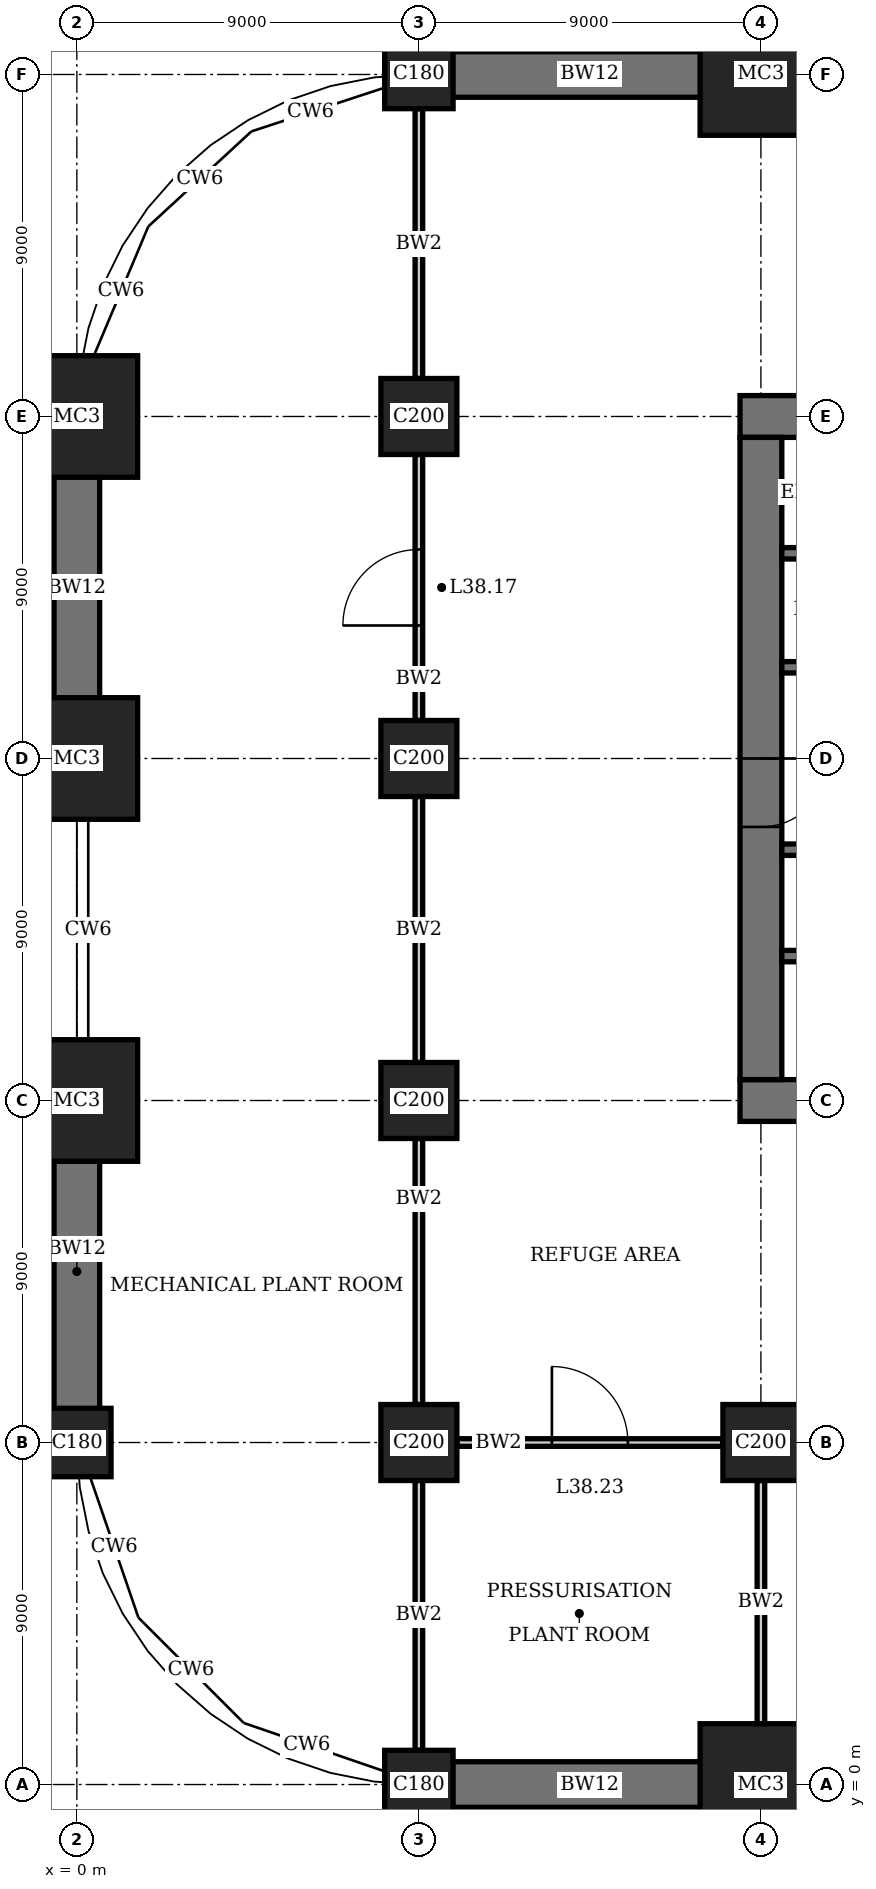
"""IFC4 building model, lengths in metres.
Left out: names, types, materials, properties, quantities, classifications, styles, units other than length and angle.
Written with IfcOpenShell. Run it as: python <this file> out.ifc"""

import sys

from ifc_helpers import new_model, si_unit, direction, frame, frame_2d, origin, origin_2d, place, context, subcontext, project, spatial, rectangle, extrude, element, fill, save


model = new_model("IFC4")
c1 = context("Model", 3, precision=1e-05, world=origin(), true_north=direction((0.0, 1.0)))
c2 = subcontext(c1, "Body", "Model", "MODEL_VIEW")
j1 = project(units=[si_unit("LENGTHUNIT", "METRE"), si_unit("PLANEANGLEUNIT", "RADIAN")], contexts=[c1])
p1 = place(None, origin())
s1 = spatial("IfcSite", under=j1, at=p1, CompositionType="ELEMENT")
p2 = place(p1, origin())
s2 = spatial("IfcBuilding", under=s1, at=p2, CompositionType="ELEMENT")
p3 = place(p2, frame((0.0, 0.0, 157.2)))
s3 = spatial("IfcBuildingStorey", under=s2, at=p3, CompositionType="ELEMENT", Elevation=157.2)
p4 = place(p3, frame((0.0, 9.0, 0.0), z_axis=(0.0, 0.0, 1.0), x_axis=(1.0, 0.0, 0.0)))
e1 = element("IfcColumn", 1, at=p4, inside=s3, PredefinedType="COLUMN", context=c2, shape_type="SweptSolid", body=[
    extrude(rectangle(XDim=1.8, YDim=1.8, at=origin_2d()), origin(), (0.0, 0.0, 1.0), 5.0),
])
for number, where, z_axis, x_axis in (
    (2, (0.0, 18.0, 0.0), (0.0, 0.0, 1.0), (1.0, 0.0, 0.0)),
    (3, (0.0, 27.0, 0.0), (0.0, 0.0, 1.0), (1.0, 0.0, 0.0)),
    (4, (0.0, 36.0, 0.0), (0.0, 0.0, 1.0), (1.0, 0.0, 0.0)),
):
    element("IfcColumn", number, at=place(p3, frame(where, z_axis=z_axis, x_axis=x_axis)), inside=s3, PredefinedType="COLUMN", context=c2, shape_type="SweptSolid", body=[
        extrude(rectangle(XDim=3.2, YDim=3.2, at=origin_2d()), origin(), (0.0, 0.0, 1.0), 5.0),
    ])
p5 = place(p3, frame((9.0, 0.0, 0.0), z_axis=(0.0, 0.0, 1.0), x_axis=(1.0, 0.0, 0.0)))
e5 = element("IfcColumn", 5, at=p5, inside=s3, PredefinedType="COLUMN", context=c2, shape_type="SweptSolid", body=[
    extrude(rectangle(XDim=1.8, YDim=1.8, at=origin_2d()), origin(), (0.0, 0.0, 1.0), 5.0),
])
for number, where, z_axis, x_axis in (
    (6, (9.0, 9.0, 0.0), (0.0, 0.0, 1.0), (1.0, 0.0, 0.0)),
    (7, (9.0, 18.0, 0.0), (0.0, 0.0, 1.0), (1.0, 0.0, 0.0)),
    (8, (9.0, 27.0, 0.0), (0.0, 0.0, 1.0), (1.0, 0.0, 0.0)),
    (9, (9.0, 36.0, 0.0), (0.0, 0.0, 1.0), (1.0, 0.0, 0.0)),
):
    element("IfcColumn", number, at=place(p3, frame(where, z_axis=z_axis, x_axis=x_axis)), inside=s3, PredefinedType="COLUMN", context=c2, shape_type="SweptSolid", body=[
        extrude(rectangle(XDim=2.0, YDim=2.0, at=origin_2d()), origin(), (0.0, 0.0, 1.0), 5.0),
    ])
p6 = place(p3, frame((9.0, 45.0, 0.0), z_axis=(0.0, 0.0, 1.0), x_axis=(1.0, 0.0, 0.0)))
e10 = element("IfcColumn", 10, at=p6, inside=s3, PredefinedType="COLUMN", context=c2, shape_type="SweptSolid", body=[
    extrude(rectangle(XDim=1.8, YDim=1.8, at=origin_2d()), origin(), (0.0, 0.0, 1.0), 5.0),
])
p7 = place(p3, frame((18.0, 0.0, 0.0), z_axis=(0.0, 0.0, 1.0), x_axis=(1.0, 0.0, 0.0)))
e11 = element("IfcColumn", 11, at=p7, inside=s3, PredefinedType="COLUMN", context=c2, shape_type="SweptSolid", body=[
    extrude(rectangle(XDim=3.2, YDim=3.2, at=origin_2d()), origin(), (0.0, 0.0, 1.0), 5.0),
])
p8 = place(p3, frame((18.0, 9.0, 0.0), z_axis=(0.0, 0.0, 1.0), x_axis=(1.0, 0.0, 0.0)))
e12 = element("IfcColumn", 12, at=p8, inside=s3, PredefinedType="COLUMN", context=c2, shape_type="SweptSolid", body=[
    extrude(rectangle(XDim=2.0, YDim=2.0, at=origin_2d()), origin(), (0.0, 0.0, 1.0), 5.0),
])
p9 = place(p3, frame((18.0, 45.0, 0.0), z_axis=(0.0, 0.0, 1.0), x_axis=(1.0, 0.0, 0.0)))
e13 = element("IfcColumn", 13, at=p9, inside=s3, PredefinedType="COLUMN", context=c2, shape_type="SweptSolid", body=[
    extrude(rectangle(XDim=3.2, YDim=3.2, at=origin_2d()), origin(), (0.0, 0.0, 1.0), 5.0),
])
p10 = place(p3, frame((17.45, 18.0, 0.0), z_axis=(0.0, 0.0, 1.0), x_axis=(1.0, 0.0, 0.0)))
e14 = element("IfcWall", 14, at=p10, inside=s3, PredefinedType="SHEAR", context=c2, shape_type="SweptSolid", body=[
    extrude(rectangle(XDim=28.1, YDim=1.1, at=frame_2d((14.05, 0.0))), origin(), (0.0, 0.0, 1.0), 5.0),
])
p11 = place(p10, frame((11.55, 0.0, 0.0)))
e15 = element("IfcOpeningElement", 15, at=p11, cuts=e14, PredefinedType="OPENING", context=c2, shape_type="SweptSolid", body=[
    extrude(rectangle(XDim=1.0, YDim=2.4, at=frame_2d((0.5, 1.2))), frame((0.0, 0.56, 0.0), z_axis=(0.0, -1.0, 0.0), x_axis=(1.0, 0.0, 0.0)), (0.0, 0.0, 1.0), 1.12),
])
p12 = place(p10, frame((16.55, 0.0, 0.0)))
e16 = element("IfcOpeningElement", 16, at=p12, cuts=e14, PredefinedType="OPENING", context=c2, shape_type="SweptSolid", body=[
    extrude(rectangle(XDim=1.0, YDim=2.4, at=frame_2d((0.5, 1.2))), frame((0.0, 0.56, 0.0), z_axis=(0.0, -1.0, 0.0), x_axis=(1.0, 0.0, 0.0)), (0.0, 0.0, 1.0), 1.12),
])
p13 = place(p10, frame((20.0, 0.0, 0.0)))
e17 = element("IfcOpeningElement", 17, at=p13, cuts=e14, PredefinedType="OPENING", context=c2, shape_type="SweptSolid", body=[
    extrude(rectangle(XDim=1.1, YDim=2.4, at=frame_2d((0.55, 1.2))), frame((0.0, 0.56, 0.0), z_axis=(0.0, -1.0, 0.0), x_axis=(1.0, 0.0, 0.0)), (0.0, 0.0, 1.0), 1.12),
])
p14 = place(p10, frame((24.05, 0.0, 0.0)))
e18 = element("IfcOpeningElement", 18, at=p14, cuts=e14, PredefinedType="OPENING", context=c2, shape_type="SweptSolid", body=[
    extrude(rectangle(XDim=1.0, YDim=2.4, at=frame_2d((0.5, 1.2))), frame((0.0, 0.56, 0.0), z_axis=(0.0, -1.0, 0.0), x_axis=(1.0, 0.0, 0.0)), (0.0, 0.0, 1.0), 1.12),
])
p15 = place(p3, frame((45.55, 36.0, 0.0), z_axis=(0.0, 0.0, 1.0), x_axis=(-1.0, 0.0, 0.0)))
e19 = element("IfcWall", 19, at=p15, inside=s3, PredefinedType="SHEAR", context=c2, shape_type="SweptSolid", body=[
    extrude(rectangle(XDim=28.1, YDim=1.1, at=frame_2d((14.05, 0.0))), origin(), (0.0, 0.0, 1.0), 5.0),
])
p16 = place(p15, frame((11.55, 0.0, 0.0)))
e20 = element("IfcOpeningElement", 20, at=p16, cuts=e19, PredefinedType="OPENING", context=c2, shape_type="SweptSolid", body=[
    extrude(rectangle(XDim=1.0, YDim=2.4, at=frame_2d((0.5, 1.2))), frame((0.0, 0.56, 0.0), z_axis=(0.0, -1.0, 0.0), x_axis=(1.0, 0.0, 0.0)), (0.0, 0.0, 1.0), 1.12),
])
p17 = place(p15, frame((16.55, 0.0, 0.0)))
e21 = element("IfcOpeningElement", 21, at=p17, cuts=e19, PredefinedType="OPENING", context=c2, shape_type="SweptSolid", body=[
    extrude(rectangle(XDim=1.0, YDim=2.4, at=frame_2d((0.5, 1.2))), frame((0.0, 0.56, 0.0), z_axis=(0.0, -1.0, 0.0), x_axis=(1.0, 0.0, 0.0)), (0.0, 0.0, 1.0), 1.12),
])
p18 = place(p15, frame((20.0, 0.0, 0.0)))
e22 = element("IfcOpeningElement", 22, at=p18, cuts=e19, PredefinedType="OPENING", context=c2, shape_type="SweptSolid", body=[
    extrude(rectangle(XDim=1.1, YDim=2.4, at=frame_2d((0.55, 1.2))), frame((0.0, 0.56, 0.0), z_axis=(0.0, -1.0, 0.0), x_axis=(1.0, 0.0, 0.0)), (0.0, 0.0, 1.0), 1.12),
])
p19 = place(p15, frame((24.05, 0.0, 0.0)))
e23 = element("IfcOpeningElement", 23, at=p19, cuts=e19, PredefinedType="OPENING", context=c2, shape_type="SweptSolid", body=[
    extrude(rectangle(XDim=1.0, YDim=2.4, at=frame_2d((0.5, 1.2))), frame((0.0, 0.56, 0.0), z_axis=(0.0, -1.0, 0.0), x_axis=(1.0, 0.0, 0.0)), (0.0, 0.0, 1.0), 1.12),
])
p20 = place(p3, frame((18.0, 35.45, 0.0), z_axis=(0.0, 0.0, 1.0), x_axis=(0.0, -1.0, 0.0)))
e24 = element("IfcWall", 24, at=p20, inside=s3, PredefinedType="SHEAR", context=c2, shape_type="SweptSolid", body=[
    extrude(rectangle(XDim=16.9, YDim=1.1, at=frame_2d((8.45, 0.0))), origin(), (0.0, 0.0, 1.0), 5.0),
])
p21 = place(p20, frame((8.45, 0.0, 0.0)))
e25 = element("IfcOpeningElement", 25, at=p21, cuts=e24, PredefinedType="OPENING", context=c2, shape_type="SweptSolid", body=[
    extrude(rectangle(XDim=1.8, YDim=2.4, at=frame_2d((0.9, 1.2))), frame((0.0, 0.56, 0.0), z_axis=(0.0, -1.0, 0.0), x_axis=(1.0, 0.0, 0.0)), (0.0, 0.0, 1.0), 1.12),
])
p22 = place(p3, frame((18.55, 21.8, 0.0), z_axis=(0.0, 0.0, 1.0), x_axis=(1.0, 0.0, 0.0)))
e26 = element("IfcWall", 26, at=p22, inside=s3, PredefinedType="SHEAR", context=c2, shape_type="SweptSolid", body=[
    extrude(rectangle(XDim=8.3, YDim=0.3, at=frame_2d((4.15, 0.0))), origin(), (0.0, 0.0, 1.0), 5.0),
])
p23 = place(p22, frame((6.85, 0.0, 0.0)))
e27 = element("IfcOpeningElement", 27, at=p23, cuts=e26, PredefinedType="OPENING", context=c2, shape_type="SweptSolid", body=[
    extrude(rectangle(XDim=1.0, YDim=2.4, at=frame_2d((0.5, 1.2))), frame((0.0, 0.16, 0.0), z_axis=(0.0, -1.0, 0.0), x_axis=(1.0, 0.0, 0.0)), (0.0, 0.0, 1.0), 0.32),
])
p24 = place(p3, frame((18.55, 24.6, 0.0), z_axis=(0.0, 0.0, 1.0), x_axis=(1.0, 0.0, 0.0)))
e28 = element("IfcWall", 28, at=p24, inside=s3, PredefinedType="SHEAR", context=c2, shape_type="SweptSolid", body=[
    extrude(rectangle(XDim=25.9, YDim=0.3, at=frame_2d((12.95, 0.0))), origin(), (0.0, 0.0, 1.0), 5.0),
])
p25 = place(p24, frame((4.95, 0.0, 0.0)))
e29 = element("IfcOpeningElement", 29, at=p25, cuts=e28, PredefinedType="OPENING", context=c2, shape_type="SweptSolid", body=[
    extrude(rectangle(XDim=1.0, YDim=2.4, at=frame_2d((0.5, 1.2))), frame((0.0, 0.16, 0.0), z_axis=(0.0, -1.0, 0.0), x_axis=(1.0, 0.0, 0.0)), (0.0, 0.0, 1.0), 0.32),
])
p26 = place(p24, frame((24.5, 0.0, 0.0)))
e30 = element("IfcOpeningElement", 30, at=p26, cuts=e28, PredefinedType="OPENING", context=c2, shape_type="SweptSolid", body=[
    extrude(rectangle(XDim=0.9, YDim=2.1, at=frame_2d((0.45, 1.05))), frame((0.0, 0.16, 0.0), z_axis=(0.0, -1.0, 0.0), x_axis=(1.0, 0.0, 0.0)), (0.0, 0.0, 1.0), 0.32),
])
p27 = place(p24, frame((9.4, 0.0, 0.0)))
e31 = element("IfcOpeningElement", 31, at=p27, cuts=e28, PredefinedType="OPENING", context=c2, shape_type="SweptSolid", body=[
    extrude(rectangle(XDim=1.1, YDim=2.4, at=frame_2d((0.55, 1.2))), frame((0.0, 0.16, 0.0), z_axis=(0.0, -1.0, 0.0), x_axis=(1.0, 0.0, 0.0)), (0.0, 0.0, 1.0), 0.32),
])
p28 = place(p24, frame((12.4, 0.0, 0.0)))
e32 = element("IfcOpeningElement", 32, at=p28, cuts=e28, PredefinedType="OPENING", context=c2, shape_type="SweptSolid", body=[
    extrude(rectangle(XDim=1.1, YDim=2.4, at=frame_2d((0.55, 1.2))), frame((0.0, 0.16, 0.0), z_axis=(0.0, -1.0, 0.0), x_axis=(1.0, 0.0, 0.0)), (0.0, 0.0, 1.0), 0.32),
])
p29 = place(p24, frame((15.4, 0.0, 0.0)))
e33 = element("IfcOpeningElement", 33, at=p29, cuts=e28, PredefinedType="OPENING", context=c2, shape_type="SweptSolid", body=[
    extrude(rectangle(XDim=1.1, YDim=2.4, at=frame_2d((0.55, 1.2))), frame((0.0, 0.16, 0.0), z_axis=(0.0, -1.0, 0.0), x_axis=(1.0, 0.0, 0.0)), (0.0, 0.0, 1.0), 0.32),
])
p30 = place(p24, frame((18.4, 0.0, 0.0)))
e34 = element("IfcOpeningElement", 34, at=p30, cuts=e28, PredefinedType="OPENING", context=c2, shape_type="SweptSolid", body=[
    extrude(rectangle(XDim=1.1, YDim=2.4, at=frame_2d((0.55, 1.2))), frame((0.0, 0.16, 0.0), z_axis=(0.0, -1.0, 0.0), x_axis=(1.0, 0.0, 0.0)), (0.0, 0.0, 1.0), 0.32),
])
p31 = place(p24, frame((21.3, 0.0, 0.0)))
e35 = element("IfcOpeningElement", 35, at=p31, cuts=e28, PredefinedType="OPENING", context=c2, shape_type="SweptSolid", body=[
    extrude(rectangle(XDim=1.3, YDim=2.4, at=frame_2d((0.65, 1.2))), frame((0.0, 0.16, 0.0), z_axis=(0.0, -1.0, 0.0), x_axis=(1.0, 0.0, 0.0)), (0.0, 0.0, 1.0), 0.32),
])
p32 = place(p3, frame((18.55, 29.4, 0.0), z_axis=(0.0, 0.0, 1.0), x_axis=(1.0, 0.0, 0.0)))
e36 = element("IfcWall", 36, at=p32, inside=s3, PredefinedType="SHEAR", context=c2, shape_type="SweptSolid", body=[
    extrude(rectangle(XDim=25.9, YDim=0.3, at=frame_2d((12.95, 0.0))), origin(), (0.0, 0.0, 1.0), 5.0),
])
p33 = place(p32, frame((19.95, 0.0, 0.0)))
e37 = element("IfcOpeningElement", 37, at=p33, cuts=e36, PredefinedType="OPENING", context=c2, shape_type="SweptSolid", body=[
    extrude(rectangle(XDim=1.0, YDim=2.4, at=frame_2d((0.5, 1.2))), frame((0.0, 0.16, 0.0), z_axis=(0.0, -1.0, 0.0), x_axis=(1.0, 0.0, 0.0)), (0.0, 0.0, 1.0), 0.32),
])
p34 = place(p32, frame((0.5, 0.0, 0.0)))
e38 = element("IfcOpeningElement", 38, at=p34, cuts=e36, PredefinedType="OPENING", context=c2, shape_type="SweptSolid", body=[
    extrude(rectangle(XDim=0.9, YDim=2.1, at=frame_2d((0.45, 1.05))), frame((0.0, 0.16, 0.0), z_axis=(0.0, -1.0, 0.0), x_axis=(1.0, 0.0, 0.0)), (0.0, 0.0, 1.0), 0.32),
])
p35 = place(p32, frame((9.4, 0.0, 0.0)))
e39 = element("IfcOpeningElement", 39, at=p35, cuts=e36, PredefinedType="OPENING", context=c2, shape_type="SweptSolid", body=[
    extrude(rectangle(XDim=1.1, YDim=2.4, at=frame_2d((0.55, 1.2))), frame((0.0, 0.16, 0.0), z_axis=(0.0, -1.0, 0.0), x_axis=(1.0, 0.0, 0.0)), (0.0, 0.0, 1.0), 0.32),
])
p36 = place(p32, frame((6.4, 0.0, 0.0)))
e40 = element("IfcOpeningElement", 40, at=p36, cuts=e36, PredefinedType="OPENING", context=c2, shape_type="SweptSolid", body=[
    extrude(rectangle(XDim=1.1, YDim=2.4, at=frame_2d((0.55, 1.2))), frame((0.0, 0.16, 0.0), z_axis=(0.0, -1.0, 0.0), x_axis=(1.0, 0.0, 0.0)), (0.0, 0.0, 1.0), 0.32),
])
p37 = place(p32, frame((3.3, 0.0, 0.0)))
e41 = element("IfcOpeningElement", 41, at=p37, cuts=e36, PredefinedType="OPENING", context=c2, shape_type="SweptSolid", body=[
    extrude(rectangle(XDim=1.3, YDim=2.4, at=frame_2d((0.65, 1.2))), frame((0.0, 0.16, 0.0), z_axis=(0.0, -1.0, 0.0), x_axis=(1.0, 0.0, 0.0)), (0.0, 0.0, 1.0), 0.32),
])
p38 = place(p3, frame((18.55, 32.4, 0.0), z_axis=(0.0, 0.0, 1.0), x_axis=(1.0, 0.0, 0.0)))
e42 = element("IfcWall", 42, at=p38, inside=s3, PredefinedType="SHEAR", context=c2, shape_type="SweptSolid", body=[
    extrude(rectangle(XDim=17.3, YDim=0.3, at=frame_2d((8.65, 0.0))), origin(), (0.0, 0.0, 1.0), 5.0),
])
for number, where, z_axis, x_axis in (
    (43, (9.0, 0.0, 0.0), (0.0, 0.0, 1.0), (1.0, 0.0, 0.0)),
    (44, (9.0, 45.0, 0.0), (0.0, 0.0, 1.0), (1.0, 0.0, 0.0)),
    (45, (0.0, 9.0, 0.0), (0.0, 0.0, 1.0), (0.0, 1.0, 0.0)),
    (46, (0.0, 27.0, 0.0), (0.0, 0.0, 1.0), (0.0, 1.0, 0.0)),
):
    element("IfcWall", number, at=place(p3, frame(where, z_axis=z_axis, x_axis=x_axis)), inside=s3, PredefinedType="SHEAR", context=c2, shape_type="SweptSolid", body=[
        extrude(rectangle(XDim=9.0, YDim=1.2, at=frame_2d((4.5, 0.0))), origin(), (0.0, 0.0, 1.0), 5.0),
    ])
p39 = place(p3, frame((9.0, 0.9, 0.0), z_axis=(0.0, 0.0, 1.0), x_axis=(0.0, 1.0, 0.0)))
e47 = element("IfcWall", 47, at=p39, inside=s3, PredefinedType="SOLIDWALL", context=c2, shape_type="SweptSolid", body=[
    extrude(rectangle(XDim=7.1, YDim=0.2, at=frame_2d((3.55, 0.0))), origin(), (0.0, 0.0, 1.0), 3.8),
])
for number, where, z_axis, x_axis in (
    (48, (9.0, 10.0, 0.0), (0.0, 0.0, 1.0), (0.0, 1.0, 0.0)),
    (49, (9.0, 19.0, 0.0), (0.0, 0.0, 1.0), (0.0, 1.0, 0.0)),
):
    element("IfcWall", number, at=place(p3, frame(where, z_axis=z_axis, x_axis=x_axis)), inside=s3, PredefinedType="SOLIDWALL", context=c2, shape_type="SweptSolid", body=[
        extrude(rectangle(XDim=7.0, YDim=0.2, at=frame_2d((3.5, 0.0))), origin(), (0.0, 0.0, 1.0), 3.8),
    ])
p40 = place(p3, frame((9.0, 28.0, 0.0), z_axis=(0.0, 0.0, 1.0), x_axis=(0.0, 1.0, 0.0)))
e50 = element("IfcWall", 50, at=p40, inside=s3, PredefinedType="SOLIDWALL", context=c2, shape_type="SweptSolid", body=[
    extrude(rectangle(XDim=7.0, YDim=0.2, at=frame_2d((3.5, 0.0))), origin(), (0.0, 0.0, 1.0), 3.8),
])
p41 = place(p40, frame((2.5, 0.0, 0.0)))
e51 = element("IfcOpeningElement", 51, at=p41, cuts=e50, PredefinedType="OPENING", context=c2, shape_type="SweptSolid", body=[
    extrude(rectangle(XDim=2.0, YDim=2.7, at=frame_2d((1.0, 1.35))), frame((0.0, 0.11, 0.0), z_axis=(0.0, -1.0, 0.0), x_axis=(1.0, 0.0, 0.0)), (0.0, 0.0, 1.0), 0.22),
])
p42 = place(p3, frame((9.0, 37.0, 0.0), z_axis=(0.0, 0.0, 1.0), x_axis=(0.0, 1.0, 0.0)))
e52 = element("IfcWall", 52, at=p42, inside=s3, PredefinedType="SOLIDWALL", context=c2, shape_type="SweptSolid", body=[
    extrude(rectangle(XDim=7.1, YDim=0.2, at=frame_2d((3.55, 0.0))), origin(), (0.0, 0.0, 1.0), 3.8),
])
p43 = place(p3, frame((18.0, 1.6, 0.0), z_axis=(0.0, 0.0, 1.0), x_axis=(0.0, 1.0, 0.0)))
e53 = element("IfcWall", 53, at=p43, inside=s3, PredefinedType="SOLIDWALL", context=c2, shape_type="SweptSolid", body=[
    extrude(rectangle(XDim=6.4, YDim=0.2, at=frame_2d((3.2, 0.0))), origin(), (0.0, 0.0, 1.0), 4.0),
])
p44 = place(p3, frame((10.0, 9.0, 0.0), z_axis=(0.0, 0.0, 1.0), x_axis=(1.0, 0.0, 0.0)))
e54 = element("IfcWall", 54, at=p44, inside=s3, PredefinedType="SOLIDWALL", context=c2, shape_type="SweptSolid", body=[
    extrude(rectangle(XDim=7.0, YDim=0.2, at=frame_2d((3.5, 0.0))), origin(), (0.0, 0.0, 1.0), 3.8),
])
p45 = place(p44, frame((2.5, 0.0, 0.0)))
e55 = element("IfcOpeningElement", 55, at=p45, cuts=e54, PredefinedType="OPENING", context=c2, shape_type="SweptSolid", body=[
    extrude(rectangle(XDim=2.0, YDim=2.7, at=frame_2d((1.0, 1.35))), frame((0.0, 0.11, 0.0), z_axis=(0.0, -1.0, 0.0), x_axis=(1.0, 0.0, 0.0)), (0.0, 0.0, 1.0), 0.22),
])
p46 = place(p21, origin())
e56 = element("IfcDoor", 56, at=p46, inside=s3, OperationType="DOUBLE_DOOR_DOUBLE_SWING", PredefinedType="DOOR", context=c2, shape_type="SweptSolid", body=[
    extrude(rectangle(XDim=1.8, YDim=2.4, at=frame_2d((0.9, 1.2))), frame((0.0, 0.03, 0.0), z_axis=(0.0, -1.0, 0.0), x_axis=(1.0, 0.0, 0.0)), (0.0, 0.0, 1.0), 0.06),
    extrude(rectangle(XDim=0.04, YDim=2.4, at=frame_2d((0.02, 1.2))), frame((0.0, 0.55, 0.0), z_axis=(0.0, -1.0, 0.0), x_axis=(1.0, 0.0, 0.0)), (0.0, 0.0, 1.0), 1.1),
    extrude(rectangle(XDim=0.04, YDim=2.4, at=frame_2d((1.78, 1.2))), frame((0.0, 0.55, 0.0), z_axis=(0.0, -1.0, 0.0), x_axis=(1.0, 0.0, 0.0)), (0.0, 0.0, 1.0), 1.1),
    extrude(rectangle(XDim=1.8, YDim=0.04, at=frame_2d((0.9, 2.38))), frame((0.0, 0.55, 0.0), z_axis=(0.0, -1.0, 0.0), x_axis=(1.0, 0.0, 0.0)), (0.0, 0.0, 1.0), 1.1),
])
fill(e25, e56)
p47 = place(p41, origin())
e57 = element("IfcDoor", 57, at=p47, inside=s3, OperationType="DOUBLE_DOOR_SINGLE_SWING", PredefinedType="DOOR", context=c2, shape_type="SweptSolid", body=[
    extrude(rectangle(XDim=2.0, YDim=2.7, at=frame_2d((1.0, 1.35))), frame((0.0, 0.03, 0.0), z_axis=(0.0, -1.0, 0.0), x_axis=(1.0, 0.0, 0.0)), (0.0, 0.0, 1.0), 0.06),
])
fill(e51, e57)
p48 = place(p45, origin())
e58 = element("IfcDoor", 58, at=p48, inside=s3, OperationType="DOUBLE_DOOR_SINGLE_SWING", PredefinedType="DOOR", context=c2, shape_type="SweptSolid", body=[
    extrude(rectangle(XDim=2.0, YDim=2.7, at=frame_2d((1.0, 1.35))), frame((0.0, 0.03, 0.0), z_axis=(0.0, -1.0, 0.0), x_axis=(1.0, 0.0, 0.0)), (0.0, 0.0, 1.0), 0.06),
])
fill(e55, e58)
save(model, sys.argv[1])
